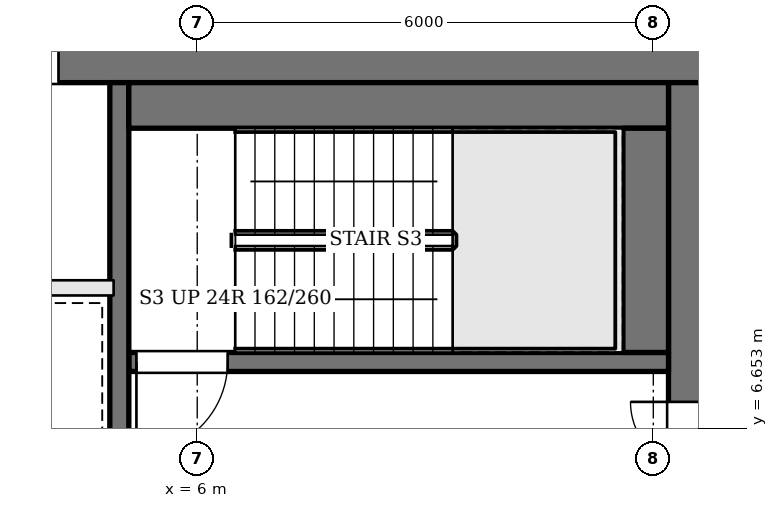
"""IFC4 building model, lengths in metres.
Left out: names, types, materials, properties, quantities, classifications, styles, units other than length and angle.
Written with IfcOpenShell. Run it as: python <this file> out.ifc"""

import sys

from ifc_helpers import new_model, si_unit, direction, frame, frame_2d, origin, place, context, subcontext, project, spatial, rectangle, extrude, element, fill, save


model = new_model("IFC4")
c1 = context("Model", 3, precision=1e-05, world=origin(), true_north=direction((0.0, 1.0)))
c2 = subcontext(c1, "Body", "Model", "MODEL_VIEW")
j1 = project(units=[si_unit("LENGTHUNIT", "METRE"), si_unit("PLANEANGLEUNIT", "RADIAN")], contexts=[c1])
p1 = place(None, origin())
s1 = spatial("IfcSite", under=j1, at=p1, CompositionType="ELEMENT")
p2 = place(p1, origin())
s2 = spatial("IfcBuilding", under=s1, at=p2, CompositionType="ELEMENT")
p3 = place(p2, frame((0.0, 0.0, 233.1)))
s3 = spatial("IfcBuildingStorey", under=s2, at=p3, CompositionType="ELEMENT", Elevation=233.1)
p4 = place(p3, frame((-13.0, 11.6, 0.0), z_axis=(0.0, 0.0, 1.0), x_axis=(1.0, 0.0, 0.0)))
e1 = element("IfcWall", 1, at=p4, inside=s3, PredefinedType="SHEAR", context=c2, shape_type="SweptSolid", body=[
    extrude(rectangle(XDim=26.0, YDim=0.8, at=frame_2d((13.0, 0.0))), origin(), (0.0, 0.0, 1.0), 3.9),
])
p5 = place(p4, frame((8.825, 0.0, 0.0)))
e2 = element("IfcOpeningElement", 2, at=p5, cuts=e1, PredefinedType="OPENING", context=c2, shape_type="SweptSolid", body=[
    extrude(rectangle(XDim=1.0, YDim=2.1, at=frame_2d((0.5, 1.05))), frame((0.0, 0.41, 0.0), z_axis=(0.0, -1.0, 0.0), x_axis=(1.0, 0.0, 0.0)), (0.0, 0.0, 1.0), 0.82),
])
p6 = place(p4, frame((11.825, 0.0, 0.0)))
e3 = element("IfcOpeningElement", 3, at=p6, cuts=e1, PredefinedType="OPENING", context=c2, shape_type="SweptSolid", body=[
    extrude(rectangle(XDim=0.7, YDim=2.1, at=frame_2d((0.35, 1.05))), frame((0.0, 0.41, 0.0), z_axis=(0.0, -1.0, 0.0), x_axis=(1.0, 0.0, 0.0)), (0.0, 0.0, 1.0), 0.82),
])
p7 = place(p4, frame((14.275, 0.0, 0.0)))
e4 = element("IfcOpeningElement", 4, at=p7, cuts=e1, PredefinedType="OPENING", context=c2, shape_type="SweptSolid", body=[
    extrude(rectangle(XDim=0.7, YDim=2.1, at=frame_2d((0.35, 1.05))), frame((0.0, 0.41, 0.0), z_axis=(0.0, -1.0, 0.0), x_axis=(1.0, 0.0, 0.0)), (0.0, 0.0, 1.0), 0.82),
])
p8 = place(p4, frame((16.175, 0.0, 0.0)))
e5 = element("IfcOpeningElement", 5, at=p8, cuts=e1, PredefinedType="OPENING", context=c2, shape_type="SweptSolid", body=[
    extrude(rectangle(XDim=1.0, YDim=2.1, at=frame_2d((0.5, 1.05))), frame((0.0, 0.41, 0.0), z_axis=(0.0, -1.0, 0.0), x_axis=(1.0, 0.0, 0.0)), (0.0, 0.0, 1.0), 0.82),
])
p9 = place(p3, frame((12.6, -2.2, 0.0), z_axis=(0.0, 0.0, 1.0), x_axis=(0.0, 1.0, 0.0)))
e6 = element("IfcWall", 6, at=p9, inside=s3, PredefinedType="SHEAR", context=c2, shape_type="SweptSolid", body=[
    extrude(rectangle(XDim=13.4, YDim=0.8, at=frame_2d((6.7, 0.0))), origin(), (0.0, 0.0, 1.0), 3.9),
])
p10 = place(p9, frame((7.4, 0.0, 0.0)))
e7 = element("IfcOpeningElement", 7, at=p10, cuts=e6, PredefinedType="OPENING", context=c2, shape_type="SweptSolid", body=[
    extrude(rectangle(XDim=1.8, YDim=2.1, at=frame_2d((0.9, 1.05))), frame((0.0, 0.41, 0.0), z_axis=(0.0, -1.0, 0.0), x_axis=(1.0, 0.0, 0.0)), (0.0, 0.0, 1.0), 0.82),
])
p11 = place(p3, frame((12.2, 7.525, 0.0), z_axis=(0.0, 0.0, 1.0), x_axis=(-1.0, 0.0, 0.0)))
e8 = element("IfcWall", 8, at=p11, inside=s3, PredefinedType="SOLIDWALL", context=c2, shape_type="SweptSolid", body=[
    extrude(rectangle(XDim=7.1, YDim=0.25, at=frame_2d((3.55, 0.0))), origin(), (0.0, 0.0, 1.0), 3.7),
])
p12 = place(p11, frame((5.8, 0.0, 0.0)))
e9 = element("IfcOpeningElement", 9, at=p12, cuts=e8, PredefinedType="OPENING", context=c2, shape_type="SweptSolid", body=[
    extrude(rectangle(XDim=1.2, YDim=2.1, at=frame_2d((0.6, 1.05))), frame((0.0, 0.135, 0.0), z_axis=(0.0, -1.0, 0.0), x_axis=(1.0, 0.0, 0.0)), (0.0, 0.0, 1.0), 0.27),
])
p13 = place(p3, frame((4.975, 11.2, 0.0), z_axis=(0.0, 0.0, 1.0), x_axis=(0.0, -1.0, 0.0)))
e10 = element("IfcWall", 10, at=p13, inside=s3, PredefinedType="SOLIDWALL", context=c2, shape_type="SweptSolid", body=[
    extrude(rectangle(XDim=13.4, YDim=0.25, at=frame_2d((6.7, 0.0))), origin(), (0.0, 0.0, 1.0), 3.7),
])
p14 = place(p13, frame((5.25, 0.0, 0.0)))
e11 = element("IfcOpeningElement", 11, at=p14, cuts=e10, PredefinedType="OPENING", context=c2, shape_type="SweptSolid", body=[
    extrude(rectangle(XDim=1.2, YDim=2.1, at=frame_2d((0.6, 1.05))), frame((0.0, 0.135, 0.0), z_axis=(0.0, -1.0, 0.0), x_axis=(1.0, 0.0, 0.0)), (0.0, 0.0, 1.0), 0.27),
])
p15 = place(p3, frame((12.2, 10.9, 0.0), z_axis=(0.0, 0.0, 1.0), x_axis=(-1.0, 0.0, 0.0)))
e12 = element("IfcWall", 12, at=p15, inside=s3, PredefinedType="SOLIDWALL", context=c2, shape_type="SweptSolid", body=[
    extrude(rectangle(XDim=7.1, YDim=0.6, at=frame_2d((3.55, 0.0))), origin(), (0.0, 0.0, 1.0), 3.7),
])
p16 = place(p3, frame((11.9, 10.6, 0.0), z_axis=(0.0, 0.0, 1.0), x_axis=(0.0, -1.0, 0.0)))
e13 = element("IfcWall", 13, at=p16, inside=s3, PredefinedType="SOLIDWALL", context=c2, shape_type="SweptSolid", body=[
    extrude(rectangle(XDim=2.95, YDim=0.6, at=frame_2d((1.475, 0.0))), origin(), (0.0, 0.0, 1.0), 3.7),
])
p17 = place(p3, frame((-4.9, 8.5, 0.0), z_axis=(0.0, 0.0, 1.0), x_axis=(1.0, 0.0, 0.0)))
e14 = element("IfcWall", 14, at=p17, inside=s3, PredefinedType="SOLIDWALL", context=c2, shape_type="SweptSolid", body=[
    extrude(rectangle(XDim=9.8, YDim=0.2, at=frame_2d((4.9, 0.0))), origin(), (0.0, 0.0, 1.0), 3.7),
])
p18 = place(p10, origin())
e15 = element("IfcDoor", 15, at=p18, inside=s3, OperationType="DOUBLE_DOOR_SINGLE_SWING", PredefinedType="DOOR", context=c2, shape_type="SweptSolid", body=[
    extrude(rectangle(XDim=1.8, YDim=2.1, at=frame_2d((0.9, 1.05))), frame((0.0, 0.025, 0.0), z_axis=(0.0, -1.0, 0.0), x_axis=(1.0, 0.0, 0.0)), (0.0, 0.0, 1.0), 0.05),
])
fill(e7, e15)
p19 = place(p12, origin())
e16 = element("IfcDoor", 16, at=p19, inside=s3, OperationType="SINGLE_SWING_RIGHT", PredefinedType="DOOR", context=c2, shape_type="SweptSolid", body=[
    extrude(rectangle(XDim=1.2, YDim=2.1, at=frame_2d((0.6, 1.05))), frame((0.0, 0.025, 0.0), z_axis=(0.0, -1.0, 0.0), x_axis=(1.0, 0.0, 0.0)), (0.0, 0.0, 1.0), 0.05),
])
fill(e9, e16)
p20 = place(p8, origin())
e17 = element("IfcDoor", 17, at=p20, inside=s3, OperationType="SINGLE_SWING_RIGHT", PredefinedType="DOOR", context=c2, shape_type="SweptSolid", body=[
    extrude(rectangle(XDim=1.0, YDim=2.1, at=frame_2d((0.5, 1.05))), frame((0.0, 0.025, 0.0), z_axis=(0.0, -1.0, 0.0), x_axis=(1.0, 0.0, 0.0)), (0.0, 0.0, 1.0), 0.05),
])
fill(e5, e17)
save(model, sys.argv[1])
